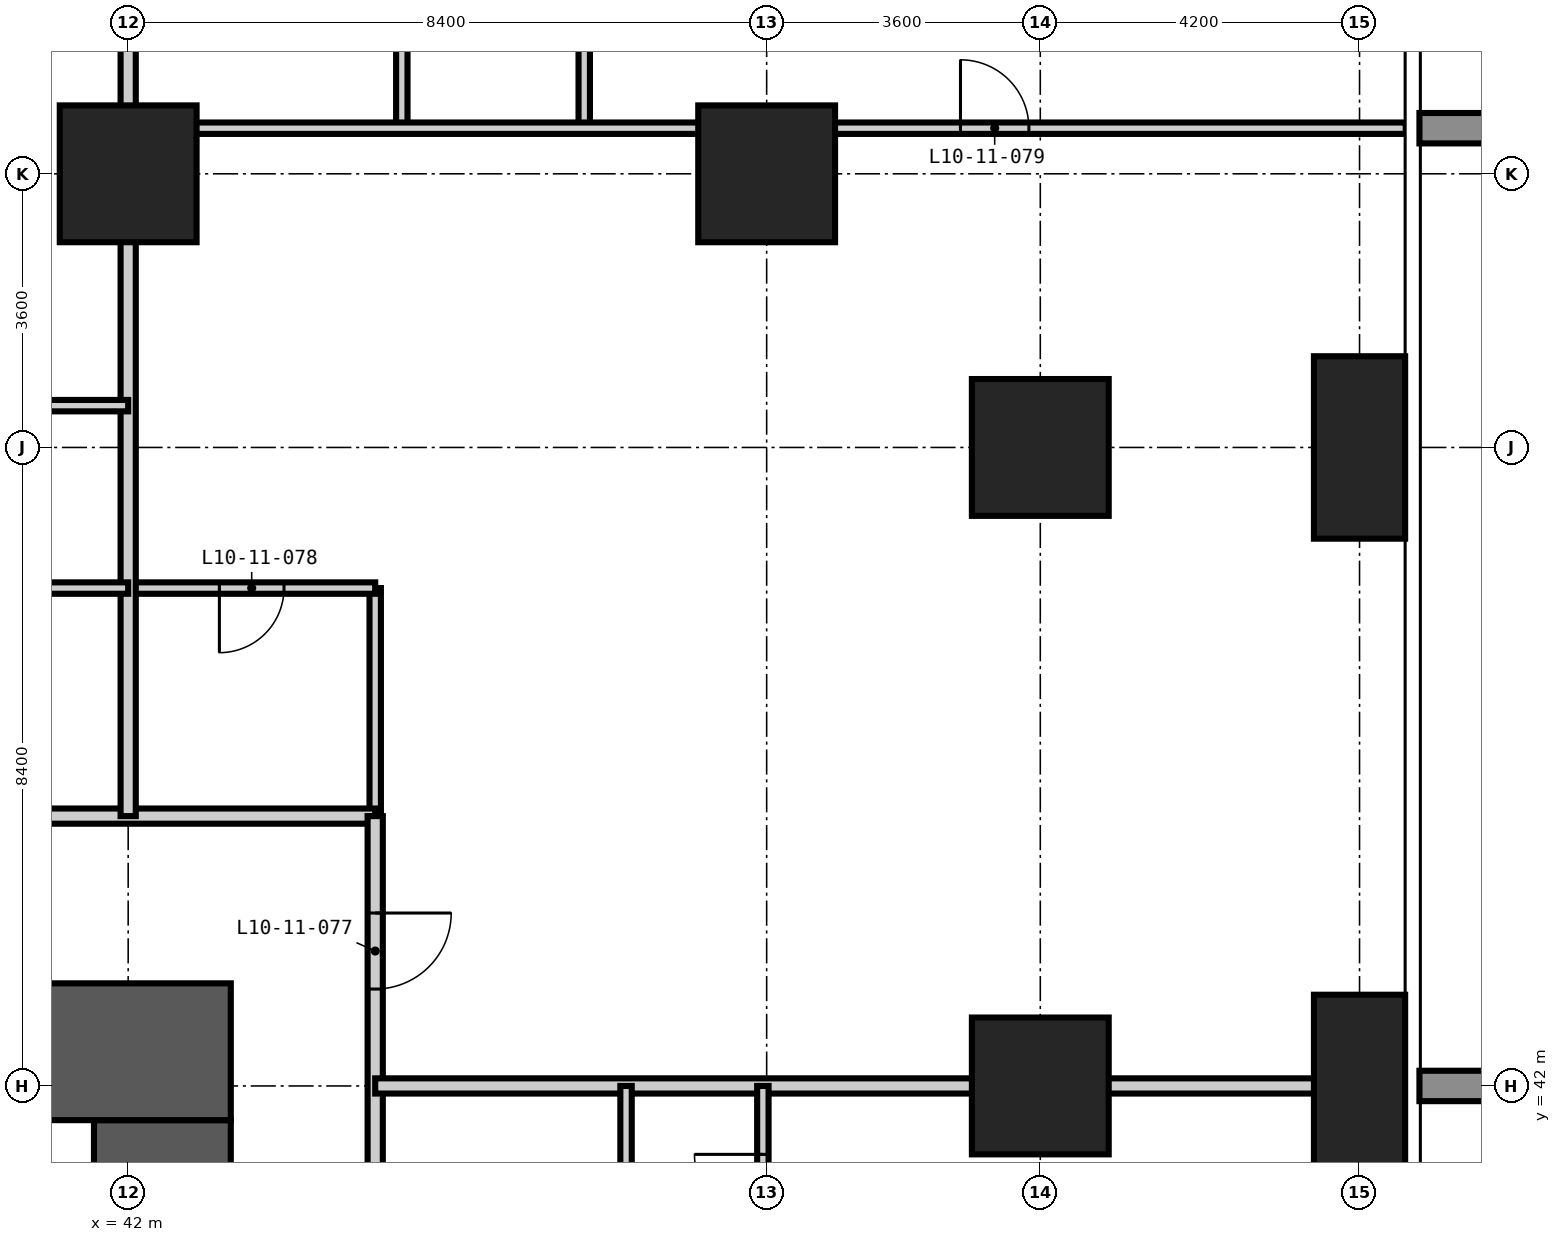
"""IFC4 building model, lengths in metres.
Left out: names, types, materials, properties, quantities, classifications, styles, units other than length and angle.
Written with IfcOpenShell. Run it as: python <this file> out.ifc"""

import sys

from ifc_helpers import new_model, si_unit, direction, frame, frame_2d, origin, origin_2d, place, context, subcontext, project, spatial, rectangle, extrude, element, fill, save


model = new_model("IFC4")
c1 = context("Model", 3, precision=1e-05, world=origin(), true_north=direction((0.0, 1.0)))
c2 = subcontext(c1, "Body", "Model", "MODEL_VIEW")
j1 = project(units=[si_unit("LENGTHUNIT", "METRE"), si_unit("PLANEANGLEUNIT", "RADIAN")], contexts=[c1])
p1 = place(None, origin())
s1 = spatial("IfcSite", under=j1, at=p1, CompositionType="ELEMENT")
p2 = place(p1, origin())
s2 = spatial("IfcBuilding", under=s1, at=p2, CompositionType="ELEMENT")
p3 = place(p2, frame((0.0, 0.0, 45.0)))
s3 = spatial("IfcBuildingStorey", under=s2, at=p3, CompositionType="ELEMENT", Elevation=45.0)
for number, where, z_axis, x_axis in (
    (1, (42.0, 54.0, -0.35), (0.0, 0.0, 1.0), (1.0, 0.0, 0.0)),
    (2, (50.4, 54.0, -0.35), (0.0, 0.0, 1.0), (1.0, 0.0, 0.0)),
    (3, (54.0, 42.0, -0.35), (0.0, 0.0, 1.0), (1.0, 0.0, 0.0)),
    (4, (54.0, 50.4, -0.35), (0.0, 0.0, 1.0), (1.0, 0.0, 0.0)),
):
    element("IfcColumn", number, at=place(p3, frame(where, z_axis=z_axis, x_axis=x_axis)), inside=s3, PredefinedType="COLUMN", context=c2, shape_type="SweptSolid", body=[
        extrude(rectangle(XDim=1.8, YDim=1.8, at=origin_2d()), origin(), (0.0, 0.0, 1.0), 3.6),
    ])
for number, where, z_axis, x_axis in (
    (5, (58.2, 42.0, -0.35), (0.0, 0.0, 1.0), (1.0, 0.0, 0.0)),
    (6, (58.2, 50.4, -0.35), (0.0, 0.0, 1.0), (1.0, 0.0, 0.0)),
):
    element("IfcColumn", number, at=place(p3, frame(where, z_axis=z_axis, x_axis=x_axis)), inside=s3, PredefinedType="COLUMN", context=c2, shape_type="SweptSolid", body=[
        extrude(rectangle(XDim=1.2, YDim=2.4, at=origin_2d()), origin(), (0.0, 0.0, 1.0), 3.6),
    ])
p4 = place(p3, frame((42.45, 17.25, -0.35), z_axis=(0.0, 0.0, 1.0), x_axis=(0.0, 1.0, 0.0)))
e7 = element("IfcWall", 7, at=p4, inside=s3, PredefinedType="SHEAR", context=c2, shape_type="SweptSolid", body=[
    extrude(rectangle(XDim=24.3, YDim=1.8, at=frame_2d((12.15, 0.0))), origin(), (0.0, 0.0, 1.0), 3.6),
])
p5 = place(p4, frame((0.35, 0.0, 0.35)))
e8 = element("IfcOpeningElement", 8, at=p5, cuts=e7, PredefinedType="OPENING", context=c2, shape_type="SweptSolid", body=[
    extrude(rectangle(XDim=1.2, YDim=2.2, at=frame_2d((0.6, 1.1))), frame((0.0, 0.91, 0.0), z_axis=(0.0, -1.0, 0.0), x_axis=(1.0, 0.0, 0.0)), (0.0, 0.0, 1.0), 1.82),
])
p6 = place(p4, frame((11.65, 0.0, 0.35)))
e9 = element("IfcOpeningElement", 9, at=p6, cuts=e7, PredefinedType="OPENING", context=c2, shape_type="SweptSolid", body=[
    extrude(rectangle(XDim=1.0, YDim=2.1, at=frame_2d((0.5, 1.05))), frame((0.0, 0.91, 0.0), z_axis=(0.0, -1.0, 0.0), x_axis=(1.0, 0.0, 0.0)), (0.0, 0.0, 1.0), 1.82),
])
p7 = place(p4, frame((20.05, 0.0, 0.35)))
e10 = element("IfcOpeningElement", 10, at=p7, cuts=e7, PredefinedType="OPENING", context=c2, shape_type="SweptSolid", body=[
    extrude(rectangle(XDim=1.0, YDim=2.1, at=frame_2d((0.5, 1.05))), frame((0.0, 0.91, 0.0), z_axis=(0.0, -1.0, 0.0), x_axis=(1.0, 0.0, 0.0)), (0.0, 0.0, 1.0), 1.82),
])
p8 = place(p3, frame((43.35, 42.45, -0.35), z_axis=(0.0, 0.0, 1.0), x_axis=(-1.0, 0.0, 0.0)))
e11 = element("IfcWall", 11, at=p8, inside=s3, PredefinedType="SHEAR", context=c2, shape_type="SweptSolid", body=[
    extrude(rectangle(XDim=27.9, YDim=1.8, at=frame_2d((13.95, 0.0))), origin(), (0.0, 0.0, 1.0), 3.6),
])
p9 = place(p8, frame((21.85, 0.0, 0.35)))
e12 = element("IfcOpeningElement", 12, at=p9, cuts=e11, PredefinedType="OPENING", context=c2, shape_type="SweptSolid", body=[
    extrude(rectangle(XDim=1.0, YDim=2.1, at=frame_2d((0.5, 1.05))), frame((0.0, 0.91, 0.0), z_axis=(0.0, -1.0, 0.0), x_axis=(1.0, 0.0, 0.0)), (0.0, 0.0, 1.0), 1.82),
])
p10 = place(p8, frame((11.25, 0.0, 0.35)))
e13 = element("IfcOpeningElement", 13, at=p10, cuts=e11, PredefinedType="OPENING", context=c2, shape_type="SweptSolid", body=[
    extrude(rectangle(XDim=1.2, YDim=2.2, at=frame_2d((0.6, 1.1))), frame((0.0, 0.91, 0.0), z_axis=(0.0, -1.0, 0.0), x_axis=(1.0, 0.0, 0.0)), (0.0, 0.0, 1.0), 1.82),
])
p11 = place(p3, frame((45.25, 45.55, 0.0), z_axis=(0.0, 0.0, 1.0), x_axis=(0.0, 1.0, 0.0)))
e14 = element("IfcWall", 14, at=p11, inside=s3, PredefinedType="PARTITIONING", context=c2, shape_type="SweptSolid", body=[
    extrude(rectangle(XDim=3.0, YDim=0.15, at=frame_2d((1.5, 0.0))), origin(), (0.0, 0.0, 1.0), 3.25),
])
p12 = place(p3, frame((42.0, 48.55, 0.0), z_axis=(0.0, 0.0, 1.0), x_axis=(1.0, 0.0, 0.0)))
e15 = element("IfcWall", 15, at=p12, inside=s3, PredefinedType="PARTITIONING", context=c2, shape_type="SweptSolid", body=[
    extrude(rectangle(XDim=3.25, YDim=0.15, at=frame_2d((1.625, 0.0))), origin(), (0.0, 0.0, 1.0), 3.25),
])
p13 = place(p12, frame((1.2, 0.0, 0.0)))
e16 = element("IfcOpeningElement", 16, at=p13, cuts=e15, PredefinedType="OPENING", context=c2, shape_type="SweptSolid", body=[
    extrude(rectangle(XDim=0.85, YDim=2.1, at=frame_2d((0.425, 1.05))), frame((0.0, 0.085, 0.0), z_axis=(0.0, -1.0, 0.0), x_axis=(1.0, 0.0, 0.0)), (0.0, 0.0, 1.0), 0.17),
])
p14 = place(p3, frame((12.95, 45.55, 0.0), z_axis=(0.0, 0.0, 1.0), x_axis=(1.0, 0.0, 0.0)))
e17 = element("IfcWall", 17, at=p14, inside=s3, PredefinedType="PARTITIONING", context=c2, shape_type="SweptSolid", body=[
    extrude(rectangle(XDim=32.3, YDim=0.2, at=frame_2d((16.15, 0.0))), origin(), (0.0, 0.0, 1.0), 3.25),
])
p15 = place(p14, frame((6.65, 0.0, 0.0)))
e18 = element("IfcOpeningElement", 18, at=p15, cuts=e17, PredefinedType="OPENING", context=c2, shape_type="SweptSolid", body=[
    extrude(rectangle(XDim=1.0, YDim=2.2, at=frame_2d((0.5, 1.1))), frame((0.0, 0.11, 0.0), z_axis=(0.0, -1.0, 0.0), x_axis=(1.0, 0.0, 0.0)), (0.0, 0.0, 1.0), 0.22),
])
p16 = place(p14, frame((15.05, 0.0, 0.0)))
e19 = element("IfcOpeningElement", 19, at=p16, cuts=e17, PredefinedType="OPENING", context=c2, shape_type="SweptSolid", body=[
    extrude(rectangle(XDim=1.0, YDim=2.2, at=frame_2d((0.5, 1.1))), frame((0.0, 0.11, 0.0), z_axis=(0.0, -1.0, 0.0), x_axis=(1.0, 0.0, 0.0)), (0.0, 0.0, 1.0), 0.22),
])
p17 = place(p14, frame((23.45, 0.0, 0.0)))
e20 = element("IfcOpeningElement", 20, at=p17, cuts=e17, PredefinedType="OPENING", context=c2, shape_type="SweptSolid", body=[
    extrude(rectangle(XDim=1.0, YDim=2.2, at=frame_2d((0.5, 1.1))), frame((0.0, 0.11, 0.0), z_axis=(0.0, -1.0, 0.0), x_axis=(1.0, 0.0, 0.0)), (0.0, 0.0, 1.0), 0.22),
])
p18 = place(p3, frame((45.25, 45.55, 0.0), z_axis=(0.0, 0.0, 1.0), x_axis=(0.0, -1.0, 0.0)))
e21 = element("IfcWall", 21, at=p18, inside=s3, PredefinedType="PARTITIONING", context=c2, shape_type="SweptSolid", body=[
    extrude(rectangle(XDim=32.6, YDim=0.2, at=frame_2d((16.3, 0.0))), origin(), (0.0, 0.0, 1.0), 3.25),
])
p19 = place(p18, frame((24.8, 0.0, 0.0)))
e22 = element("IfcOpeningElement", 22, at=p19, cuts=e21, PredefinedType="OPENING", context=c2, shape_type="SweptSolid", body=[
    extrude(rectangle(XDim=1.0, YDim=2.2, at=frame_2d((0.5, 1.1))), frame((0.0, 0.11, 0.0), z_axis=(0.0, -1.0, 0.0), x_axis=(1.0, 0.0, 0.0)), (0.0, 0.0, 1.0), 0.22),
])
p20 = place(p18, frame((19.85, 0.0, 0.0)))
e23 = element("IfcOpeningElement", 23, at=p20, cuts=e21, PredefinedType="OPENING", context=c2, shape_type="SweptSolid", body=[
    extrude(rectangle(XDim=1.0, YDim=2.2, at=frame_2d((0.5, 1.1))), frame((0.0, 0.11, 0.0), z_axis=(0.0, -1.0, 0.0), x_axis=(1.0, 0.0, 0.0)), (0.0, 0.0, 1.0), 0.22),
])
p21 = place(p18, frame((11.45, 0.0, 0.0)))
e24 = element("IfcOpeningElement", 24, at=p21, cuts=e21, PredefinedType="OPENING", context=c2, shape_type="SweptSolid", body=[
    extrude(rectangle(XDim=1.0, YDim=2.2, at=frame_2d((0.5, 1.1))), frame((0.0, 0.11, 0.0), z_axis=(0.0, -1.0, 0.0), x_axis=(1.0, 0.0, 0.0)), (0.0, 0.0, 1.0), 0.22),
])
p22 = place(p18, frame((6.5, 0.0, 0.0)))
e25 = element("IfcOpeningElement", 25, at=p22, cuts=e21, PredefinedType="OPENING", context=c2, shape_type="SweptSolid", body=[
    extrude(rectangle(XDim=1.0, YDim=2.2, at=frame_2d((0.5, 1.1))), frame((0.0, 0.11, 0.0), z_axis=(0.0, -1.0, 0.0), x_axis=(1.0, 0.0, 0.0)), (0.0, 0.0, 1.0), 0.22),
])
p23 = place(p18, frame((30.175, 0.0, 0.0)))
e26 = element("IfcOpeningElement", 26, at=p23, cuts=e21, PredefinedType="OPENING", context=c2, shape_type="SweptSolid", body=[
    extrude(rectangle(XDim=1.0, YDim=2.2, at=frame_2d((0.5, 1.1))), frame((0.0, 0.11, 0.0), z_axis=(0.0, -1.0, 0.0), x_axis=(1.0, 0.0, 0.0)), (0.0, 0.0, 1.0), 0.22),
])
p24 = place(p18, frame((1.275, 0.0, 0.0)))
e27 = element("IfcOpeningElement", 27, at=p24, cuts=e21, PredefinedType="OPENING", context=c2, shape_type="SweptSolid", body=[
    extrude(rectangle(XDim=1.0, YDim=2.2, at=frame_2d((0.5, 1.1))), frame((0.0, 0.11, 0.0), z_axis=(0.0, -1.0, 0.0), x_axis=(1.0, 0.0, 0.0)), (0.0, 0.0, 1.0), 0.22),
])
p25 = place(p3, frame((42.0, 45.55, 0.0), z_axis=(0.0, 0.0, 1.0), x_axis=(0.0, 1.0, 0.0)))
e28 = element("IfcWall", 28, at=p25, inside=s3, PredefinedType="PARTITIONING", context=c2, shape_type="SweptSolid", body=[
    extrude(rectangle(XDim=13.258, YDim=0.2, at=frame_2d((6.629, 0.0))), origin(), (0.0, 0.0, 1.0), 3.25),
])
p26 = place(p3, frame((45.25, 42.0, 0.0), z_axis=(0.0, 0.0, 1.0), x_axis=(1.0, 0.0, 0.0)))
e29 = element("IfcWall", 29, at=p26, inside=s3, PredefinedType="PARTITIONING", context=c2, shape_type="SweptSolid", body=[
    extrude(rectangle(XDim=13.558, YDim=0.2, at=frame_2d((6.779, 0.0))), origin(), (0.0, 0.0, 1.0), 3.25),
])
p27 = place(p3, frame((45.6, 54.6, 0.0), z_axis=(0.0, 0.0, 1.0), x_axis=(0.0, 1.0, 0.0)))
e30 = element("IfcWall", 30, at=p27, inside=s3, PredefinedType="PARTITIONING", context=c2, shape_type="SweptSolid", body=[
    extrude(rectangle(XDim=3.0, YDim=0.15, at=frame_2d((1.5, 0.0))), origin(), (0.0, 0.0, 1.0), 3.25),
])
p28 = place(p3, frame((48.0, 54.6, 0.0), z_axis=(0.0, 0.0, 1.0), x_axis=(0.0, 1.0, 0.0)))
e31 = element("IfcWall", 31, at=p28, inside=s3, PredefinedType="PARTITIONING", context=c2, shape_type="SweptSolid", body=[
    extrude(rectangle(XDim=3.0, YDim=0.15, at=frame_2d((1.5, 0.0))), origin(), (0.0, 0.0, 1.0), 3.25),
])
p29 = place(p28, frame((1.05, 0.0, 0.0)))
e32 = element("IfcOpeningElement", 32, at=p29, cuts=e31, PredefinedType="OPENING", context=c2, shape_type="SweptSolid", body=[
    extrude(rectangle(XDim=0.9, YDim=2.1, at=frame_2d((0.45, 1.05))), frame((0.0, 0.085, 0.0), z_axis=(0.0, -1.0, 0.0), x_axis=(1.0, 0.0, 0.0)), (0.0, 0.0, 1.0), 0.17),
])
p30 = place(p3, frame((48.55, 39.3, 0.0), z_axis=(0.0, 0.0, 1.0), x_axis=(0.0, 1.0, 0.0)))
e33 = element("IfcWall", 33, at=p30, inside=s3, PredefinedType="PARTITIONING", context=c2, shape_type="SweptSolid", body=[
    extrude(rectangle(XDim=2.7, YDim=0.15, at=frame_2d((1.35, 0.0))), origin(), (0.0, 0.0, 1.0), 3.25),
])
p31 = place(p3, frame((50.35, 39.3, 0.0), z_axis=(0.0, 0.0, 1.0), x_axis=(0.0, 1.0, 0.0)))
e34 = element("IfcWall", 34, at=p31, inside=s3, PredefinedType="PARTITIONING", context=c2, shape_type="SweptSolid", body=[
    extrude(rectangle(XDim=2.7, YDim=0.15, at=frame_2d((1.35, 0.0))), origin(), (0.0, 0.0, 1.0), 3.25),
])
p32 = place(p31, frame((0.9, 0.0, 0.0)))
e35 = element("IfcOpeningElement", 35, at=p32, cuts=e34, PredefinedType="OPENING", context=c2, shape_type="SweptSolid", body=[
    extrude(rectangle(XDim=0.9, YDim=2.1, at=frame_2d((0.45, 1.05))), frame((0.0, 0.085, 0.0), z_axis=(0.0, -1.0, 0.0), x_axis=(1.0, 0.0, 0.0)), (0.0, 0.0, 1.0), 0.17),
])
p33 = place(p3, frame((37.8, 48.55, 0.0), z_axis=(0.0, 0.0, 1.0), x_axis=(1.0, 0.0, 0.0)))
e36 = element("IfcWall", 36, at=p33, inside=s3, PredefinedType="PARTITIONING", context=c2, shape_type="SweptSolid", body=[
    extrude(rectangle(XDim=4.2, YDim=0.15, at=frame_2d((2.1, 0.0))), origin(), (0.0, 0.0, 1.0), 3.25),
])
p34 = place(p3, frame((37.8, 50.95, 0.0), z_axis=(0.0, 0.0, 1.0), x_axis=(1.0, 0.0, 0.0)))
e37 = element("IfcWall", 37, at=p34, inside=s3, PredefinedType="PARTITIONING", context=c2, shape_type="SweptSolid", body=[
    extrude(rectangle(XDim=4.2, YDim=0.15, at=frame_2d((2.1, 0.0))), origin(), (0.0, 0.0, 1.0), 3.25),
])
p35 = place(p34, frame((1.65, 0.0, 0.0)))
e38 = element("IfcOpeningElement", 38, at=p35, cuts=e37, PredefinedType="OPENING", context=c2, shape_type="SweptSolid", body=[
    extrude(rectangle(XDim=0.9, YDim=2.1, at=frame_2d((0.45, 1.05))), frame((0.0, 0.085, 0.0), z_axis=(0.0, -1.0, 0.0), x_axis=(1.0, 0.0, 0.0)), (0.0, 0.0, 1.0), 0.17),
])
p36 = place(p3, frame((42.0, 54.6, 0.0), z_axis=(0.0, 0.0, 1.0), x_axis=(1.0, 0.0, 0.0)))
e39 = element("IfcWall", 39, at=p36, inside=s3, PredefinedType="PARTITIONING", context=c2, shape_type="SweptSolid", body=[
    extrude(rectangle(XDim=16.808, YDim=0.15, at=frame_2d((8.404, 0.0))), origin(), (0.0, 0.0, 1.0), 3.25),
])
p37 = place(p36, frame((10.95, 0.0, 0.0)))
e40 = element("IfcOpeningElement", 40, at=p37, cuts=e39, PredefinedType="OPENING", context=c2, shape_type="SweptSolid", body=[
    extrude(rectangle(XDim=0.9, YDim=2.1, at=frame_2d((0.45, 1.05))), frame((0.0, 0.085, 0.0), z_axis=(0.0, -1.0, 0.0), x_axis=(1.0, 0.0, 0.0)), (0.0, 0.0, 1.0), 0.17),
])
p38 = place(p32, origin())
e41 = element("IfcDoor", 41, at=p38, inside=s3, OperationType="SINGLE_SWING_RIGHT", PredefinedType="DOOR", context=c2, shape_type="SweptSolid", body=[
    extrude(rectangle(XDim=0.9, YDim=2.1, at=frame_2d((0.45, 1.05))), frame((0.0, 0.025, 0.0), z_axis=(0.0, -1.0, 0.0), x_axis=(1.0, 0.0, 0.0)), (0.0, 0.0, 1.0), 0.05),
])
fill(e35, e41)
p39 = place(p24, origin())
e42 = element("IfcDoor", 42, at=p39, inside=s3, OperationType="SINGLE_SWING_LEFT", PredefinedType="DOOR", context=c2, shape_type="SweptSolid", body=[
    extrude(rectangle(XDim=1.0, YDim=2.2, at=frame_2d((0.5, 1.1))), frame((0.0, 0.025, 0.0), z_axis=(0.0, -1.0, 0.0), x_axis=(1.0, 0.0, 0.0)), (0.0, 0.0, 1.0), 0.05),
])
fill(e27, e42)
p40 = place(p13, frame((0.85, 0.0, 0.0), z_axis=(0.0, 0.0, 1.0), x_axis=(-1.0, 0.0, 0.0)))
e43 = element("IfcDoor", 43, at=p40, inside=s3, OperationType="SINGLE_SWING_RIGHT", PredefinedType="DOOR", context=c2, shape_type="SweptSolid", body=[
    extrude(rectangle(XDim=0.85, YDim=2.1, at=frame_2d((0.425, 1.05))), frame((0.0, 0.025, 0.0), z_axis=(0.0, -1.0, 0.0), x_axis=(1.0, 0.0, 0.0)), (0.0, 0.0, 1.0), 0.05),
])
fill(e16, e43)
p41 = place(p37, origin())
e44 = element("IfcDoor", 44, at=p41, inside=s3, OperationType="SINGLE_SWING_LEFT", PredefinedType="DOOR", context=c2, shape_type="SweptSolid", body=[
    extrude(rectangle(XDim=0.9, YDim=2.1, at=frame_2d((0.45, 1.05))), frame((0.0, 0.025, 0.0), z_axis=(0.0, -1.0, 0.0), x_axis=(1.0, 0.0, 0.0)), (0.0, 0.0, 1.0), 0.05),
])
fill(e40, e44)
save(model, sys.argv[1])
